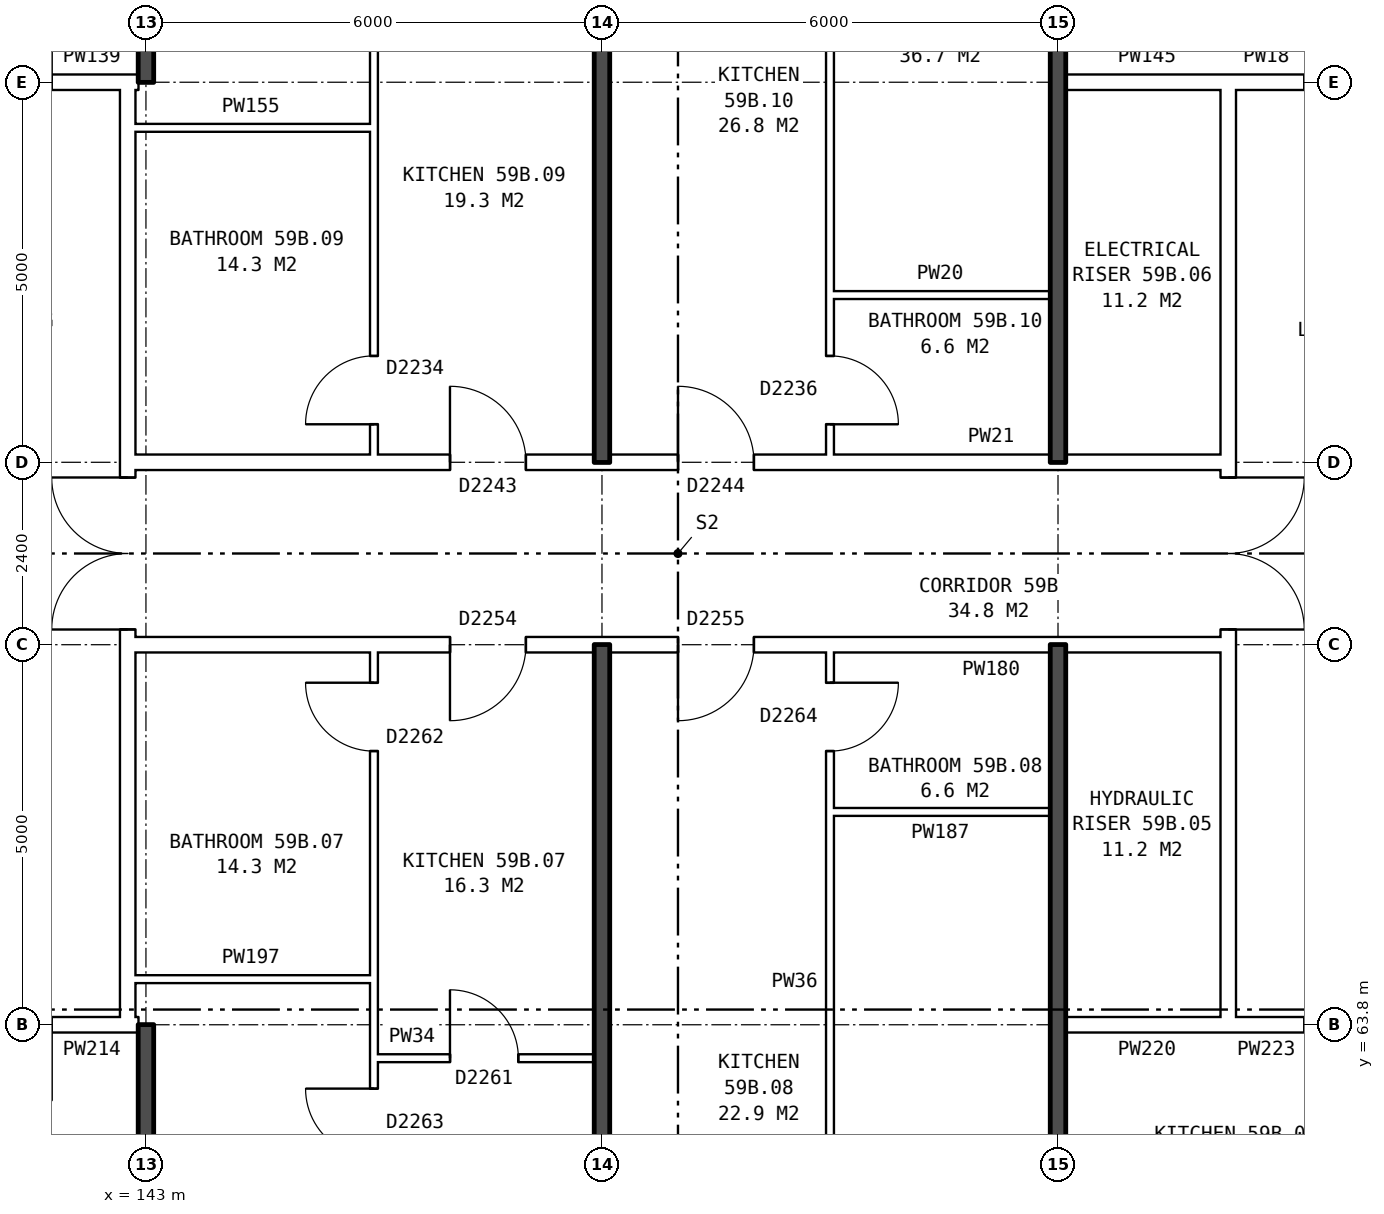
"""IFC4 building model, lengths in metres.
Left out: names, types, materials, properties, quantities, classifications, styles, units other than length and angle.
Written with IfcOpenShell. Run it as: python <this file> out.ifc"""

import sys

from ifc_helpers import new_model, si_unit, direction, frame, frame_2d, origin, place, context, subcontext, project, spatial, rectangle, extrude, element, fill, save


model = new_model("IFC4")
c1 = context("Model", 3, precision=1e-05, world=origin(), true_north=direction((0.0, 1.0)))
c2 = subcontext(c1, "Body", "Model", "MODEL_VIEW")
j1 = project(units=[si_unit("LENGTHUNIT", "METRE"), si_unit("PLANEANGLEUNIT", "RADIAN")], contexts=[c1])
p1 = place(None, origin())
s1 = spatial("IfcSite", under=j1, at=p1, CompositionType="ELEMENT")
p2 = place(p1, origin())
s2 = spatial("IfcBuilding", under=s1, at=p2, CompositionType="ELEMENT")
p3 = place(p2, frame((0.0, 0.0, 209.0)))
s3 = spatial("IfcBuildingStorey", under=s2, at=p3, CompositionType="ELEMENT", Elevation=209.0)
p4 = place(p3, frame((142.76, 63.9, 0.0), z_axis=(0.0, 0.0, 1.0), x_axis=(0.0, 1.0, 0.0)))
e1 = element("IfcWall", 1, at=p4, inside=s3, PredefinedType="PARTITIONING", context=c2, shape_type="SweptSolid", body=[
    extrude(rectangle(XDim=12.2, YDim=0.2, at=frame_2d((6.1, 0.0))), origin(), (0.0, 0.0, 1.0), 2.85),
])
p5 = place(p4, frame((5.1, 0.0, 0.0)))
e2 = element("IfcOpeningElement", 2, at=p5, cuts=e1, PredefinedType="OPENING", context=c2, shape_type="SweptSolid", body=[
    extrude(rectangle(XDim=2.0, YDim=2.1, at=frame_2d((1.0, 1.05))), frame((0.0, 0.11, 0.0), z_axis=(0.0, -1.0, 0.0), x_axis=(1.0, 0.0, 0.0)), (0.0, 0.0, 1.0), 0.22),
])
p6 = place(p3, frame((157.24, 63.9, 0.0), z_axis=(0.0, 0.0, 1.0), x_axis=(0.0, 1.0, 0.0)))
e3 = element("IfcWall", 3, at=p6, inside=s3, PredefinedType="PARTITIONING", context=c2, shape_type="SweptSolid", body=[
    extrude(rectangle(XDim=12.2, YDim=0.2, at=frame_2d((6.1, 0.0))), origin(), (0.0, 0.0, 1.0), 2.85),
])
p7 = place(p6, frame((5.1, 0.0, 0.0)))
e4 = element("IfcOpeningElement", 4, at=p7, cuts=e3, PredefinedType="OPENING", context=c2, shape_type="SweptSolid", body=[
    extrude(rectangle(XDim=2.0, YDim=2.1, at=frame_2d((1.0, 1.05))), frame((0.0, 0.11, 0.0), z_axis=(0.0, -1.0, 0.0), x_axis=(1.0, 0.0, 0.0)), (0.0, 0.0, 1.0), 0.22),
])
p8 = place(p3, frame((146.0, 63.36, 0.0), z_axis=(0.0, 0.0, 1.0), x_axis=(1.0, 0.0, 0.0)))
e5 = element("IfcWall", 5, at=p8, inside=s3, PredefinedType="PARTITIONING", context=c2, shape_type="SweptSolid", body=[
    extrude(rectangle(XDim=2.9, YDim=0.1, at=frame_2d((1.45, 0.0))), origin(), (0.0, 0.0, 1.0), 2.85),
])
p9 = place(p8, frame((1.0, 0.0, 0.0)))
e6 = element("IfcOpeningElement", 6, at=p9, cuts=e5, PredefinedType="OPENING", context=c2, shape_type="SweptSolid", body=[
    extrude(rectangle(XDim=0.9, YDim=2.1, at=frame_2d((0.45, 1.05))), frame((0.0, 0.06, 0.0), z_axis=(0.0, -1.0, 0.0), x_axis=(1.0, 0.0, 0.0)), (0.0, 0.0, 1.0), 0.12),
])
p10 = place(p3, frame((139.76, 63.8, 0.0), z_axis=(0.0, 0.0, 1.0), x_axis=(1.0, 0.0, 0.0)))
e7 = element("IfcWall", 7, at=p10, inside=s3, PredefinedType="PARTITIONING", context=c2, shape_type="SweptSolid", body=[
    extrude(rectangle(XDim=3.0, YDim=0.2, at=frame_2d((1.5, 0.0))), origin(), (0.0, 0.0, 1.0), 2.85),
])
p11 = place(p10, frame((1.0, 0.0, 0.0)))
e8 = element("IfcOpeningElement", 8, at=p11, cuts=e7, PredefinedType="OPENING", context=c2, shape_type="SweptSolid", body=[
    extrude(rectangle(XDim=1.0, YDim=2.1, at=frame_2d((0.5, 1.05))), frame((0.0, 0.11, 0.0), z_axis=(0.0, -1.0, 0.0), x_axis=(1.0, 0.0, 0.0)), (0.0, 0.0, 1.0), 0.22),
])
p12 = place(p3, frame((142.76, 63.8, 0.0), z_axis=(0.0, 0.0, 1.0), x_axis=(1.0, 0.0, 0.0)))
e9 = element("IfcWall", 9, at=p12, inside=s3, PredefinedType="PARTITIONING", context=c2, shape_type="SweptSolid", body=[
    extrude(rectangle(XDim=0.14, YDim=0.2, at=frame_2d((0.07, 0.0))), origin(), (0.0, 0.0, 1.0), 2.85),
])
p13 = place(p3, frame((155.1, 63.8, 0.0), z_axis=(0.0, 0.0, 1.0), x_axis=(1.0, 0.0, 0.0)))
e10 = element("IfcWall", 10, at=p13, inside=s3, PredefinedType="PARTITIONING", context=c2, shape_type="SweptSolid", body=[
    extrude(rectangle(XDim=2.14, YDim=0.2, at=frame_2d((1.07, 0.0))), origin(), (0.0, 0.0, 1.0), 2.85),
])
p14 = place(p3, frame((157.24, 63.8, 0.0), z_axis=(0.0, 0.0, 1.0), x_axis=(1.0, 0.0, 0.0)))
e11 = element("IfcWall", 11, at=p14, inside=s3, PredefinedType="PARTITIONING", context=c2, shape_type="SweptSolid", body=[
    extrude(rectangle(XDim=3.0, YDim=0.2, at=frame_2d((1.5, 0.0))), origin(), (0.0, 0.0, 1.0), 2.85),
])
p15 = place(p14, frame((1.0, 0.0, 0.0)))
e12 = element("IfcOpeningElement", 12, at=p15, cuts=e11, PredefinedType="OPENING", context=c2, shape_type="SweptSolid", body=[
    extrude(rectangle(XDim=1.0, YDim=2.1, at=frame_2d((0.5, 1.05))), frame((0.0, 0.11, 0.0), z_axis=(0.0, -1.0, 0.0), x_axis=(1.0, 0.0, 0.0)), (0.0, 0.0, 1.0), 0.22),
])
p16 = place(p3, frame((142.76, 64.4, 0.0), z_axis=(0.0, 0.0, 1.0), x_axis=(1.0, 0.0, 0.0)))
e13 = element("IfcWall", 13, at=p16, inside=s3, PredefinedType="PARTITIONING", context=c2, shape_type="SweptSolid", body=[
    extrude(rectangle(XDim=3.24, YDim=0.1, at=frame_2d((1.62, 0.0))), origin(), (0.0, 0.0, 1.0), 2.85),
])
p17 = place(p3, frame((152.0, 66.6, 0.0), z_axis=(0.0, 0.0, 1.0), x_axis=(1.0, 0.0, 0.0)))
e14 = element("IfcWall", 14, at=p17, inside=s3, PredefinedType="PARTITIONING", context=c2, shape_type="SweptSolid", body=[
    extrude(rectangle(XDim=2.9, YDim=0.1, at=frame_2d((1.45, 0.0))), origin(), (0.0, 0.0, 1.0), 2.85),
])
p18 = place(p3, frame((142.76, 68.8, 0.0), z_axis=(0.0, 0.0, 1.0), x_axis=(1.0, 0.0, 0.0)))
e15 = element("IfcWall", 15, at=p18, inside=s3, PredefinedType="PARTITIONING", context=c2, shape_type="SweptSolid", body=[
    extrude(rectangle(XDim=14.48, YDim=0.2, at=frame_2d((7.24, 0.0))), origin(), (0.0, 0.0, 1.0), 2.85),
])
p19 = place(p18, frame((4.24, 0.0, 0.0)))
e16 = element("IfcOpeningElement", 16, at=p19, cuts=e15, PredefinedType="OPENING", context=c2, shape_type="SweptSolid", body=[
    extrude(rectangle(XDim=1.0, YDim=2.1, at=frame_2d((0.5, 1.05))), frame((0.0, 0.11, 0.0), z_axis=(0.0, -1.0, 0.0), x_axis=(1.0, 0.0, 0.0)), (0.0, 0.0, 1.0), 0.22),
])
p20 = place(p18, frame((7.24, 0.0, 0.0)))
e17 = element("IfcOpeningElement", 17, at=p20, cuts=e15, PredefinedType="OPENING", context=c2, shape_type="SweptSolid", body=[
    extrude(rectangle(XDim=1.0, YDim=2.1, at=frame_2d((0.5, 1.05))), frame((0.0, 0.11, 0.0), z_axis=(0.0, -1.0, 0.0), x_axis=(1.0, 0.0, 0.0)), (0.0, 0.0, 1.0), 0.22),
])
p21 = place(p3, frame((142.76, 71.2, 0.0), z_axis=(0.0, 0.0, 1.0), x_axis=(1.0, 0.0, 0.0)))
e18 = element("IfcWall", 18, at=p21, inside=s3, PredefinedType="PARTITIONING", context=c2, shape_type="SweptSolid", body=[
    extrude(rectangle(XDim=14.48, YDim=0.2, at=frame_2d((7.24, 0.0))), origin(), (0.0, 0.0, 1.0), 2.85),
])
p22 = place(p21, frame((4.24, 0.0, 0.0)))
e19 = element("IfcOpeningElement", 19, at=p22, cuts=e18, PredefinedType="OPENING", context=c2, shape_type="SweptSolid", body=[
    extrude(rectangle(XDim=1.0, YDim=2.1, at=frame_2d((0.5, 1.05))), frame((0.0, 0.11, 0.0), z_axis=(0.0, -1.0, 0.0), x_axis=(1.0, 0.0, 0.0)), (0.0, 0.0, 1.0), 0.22),
])
p23 = place(p21, frame((7.24, 0.0, 0.0)))
e20 = element("IfcOpeningElement", 20, at=p23, cuts=e18, PredefinedType="OPENING", context=c2, shape_type="SweptSolid", body=[
    extrude(rectangle(XDim=1.0, YDim=2.1, at=frame_2d((0.5, 1.05))), frame((0.0, 0.11, 0.0), z_axis=(0.0, -1.0, 0.0), x_axis=(1.0, 0.0, 0.0)), (0.0, 0.0, 1.0), 0.22),
])
p24 = place(p3, frame((152.0, 73.4, 0.0), z_axis=(0.0, 0.0, 1.0), x_axis=(1.0, 0.0, 0.0)))
e21 = element("IfcWall", 21, at=p24, inside=s3, PredefinedType="PARTITIONING", context=c2, shape_type="SweptSolid", body=[
    extrude(rectangle(XDim=2.9, YDim=0.1, at=frame_2d((1.45, 0.0))), origin(), (0.0, 0.0, 1.0), 2.85),
])
p25 = place(p3, frame((142.76, 75.6, 0.0), z_axis=(0.0, 0.0, 1.0), x_axis=(1.0, 0.0, 0.0)))
e22 = element("IfcWall", 22, at=p25, inside=s3, PredefinedType="PARTITIONING", context=c2, shape_type="SweptSolid", body=[
    extrude(rectangle(XDim=3.24, YDim=0.1, at=frame_2d((1.62, 0.0))), origin(), (0.0, 0.0, 1.0), 2.85),
])
p26 = place(p3, frame((139.76, 76.2, 0.0), z_axis=(0.0, 0.0, 1.0), x_axis=(1.0, 0.0, 0.0)))
e23 = element("IfcWall", 23, at=p26, inside=s3, PredefinedType="PARTITIONING", context=c2, shape_type="SweptSolid", body=[
    extrude(rectangle(XDim=3.0, YDim=0.2, at=frame_2d((1.5, 0.0))), origin(), (0.0, 0.0, 1.0), 2.85),
])
p27 = place(p26, frame((1.0, 0.0, 0.0)))
e24 = element("IfcOpeningElement", 24, at=p27, cuts=e23, PredefinedType="OPENING", context=c2, shape_type="SweptSolid", body=[
    extrude(rectangle(XDim=1.0, YDim=2.1, at=frame_2d((0.5, 1.05))), frame((0.0, 0.11, 0.0), z_axis=(0.0, -1.0, 0.0), x_axis=(1.0, 0.0, 0.0)), (0.0, 0.0, 1.0), 0.22),
])
p28 = place(p3, frame((142.76, 76.2, 0.0), z_axis=(0.0, 0.0, 1.0), x_axis=(1.0, 0.0, 0.0)))
e25 = element("IfcWall", 25, at=p28, inside=s3, PredefinedType="PARTITIONING", context=c2, shape_type="SweptSolid", body=[
    extrude(rectangle(XDim=0.14, YDim=0.2, at=frame_2d((0.07, 0.0))), origin(), (0.0, 0.0, 1.0), 2.85),
])
p29 = place(p3, frame((155.1, 76.2, 0.0), z_axis=(0.0, 0.0, 1.0), x_axis=(1.0, 0.0, 0.0)))
e26 = element("IfcWall", 26, at=p29, inside=s3, PredefinedType="PARTITIONING", context=c2, shape_type="SweptSolid", body=[
    extrude(rectangle(XDim=2.14, YDim=0.2, at=frame_2d((1.07, 0.0))), origin(), (0.0, 0.0, 1.0), 2.85),
])
p30 = place(p3, frame((157.24, 76.2, 0.0), z_axis=(0.0, 0.0, 1.0), x_axis=(1.0, 0.0, 0.0)))
e27 = element("IfcWall", 27, at=p30, inside=s3, PredefinedType="PARTITIONING", context=c2, shape_type="SweptSolid", body=[
    extrude(rectangle(XDim=3.0, YDim=0.2, at=frame_2d((1.5, 0.0))), origin(), (0.0, 0.0, 1.0), 2.85),
])
p31 = place(p30, frame((1.0, 0.0, 0.0)))
e28 = element("IfcOpeningElement", 28, at=p31, cuts=e27, PredefinedType="OPENING", context=c2, shape_type="SweptSolid", body=[
    extrude(rectangle(XDim=1.0, YDim=2.1, at=frame_2d((0.5, 1.05))), frame((0.0, 0.11, 0.0), z_axis=(0.0, -1.0, 0.0), x_axis=(1.0, 0.0, 0.0)), (0.0, 0.0, 1.0), 0.22),
])
for number, where, z_axis, x_axis in (
    (29, (143.0, 54.36, 0.0), (0.0, 0.0, 1.0), (0.0, 1.0, 0.0)),
    (30, (143.0, 76.2, 0.0), (0.0, 0.0, 1.0), (0.0, 1.0, 0.0)),
):
    element("IfcWall", number, at=place(p3, frame(where, z_axis=z_axis, x_axis=x_axis)), inside=s3, PredefinedType="SOLIDWALL", context=c2, shape_type="SweptSolid", body=[
        extrude(rectangle(XDim=9.44, YDim=0.2, at=frame_2d((4.72, 0.0))), origin(), (0.0, 0.0, 1.0), 2.85),
    ])
p32 = place(p3, frame((146.0, 54.36, 0.0), z_axis=(0.0, 0.0, 1.0), x_axis=(0.0, 1.0, 0.0)))
e31 = element("IfcWall", 31, at=p32, inside=s3, PredefinedType="PARTITIONING", context=c2, shape_type="SweptSolid", body=[
    extrude(rectangle(XDim=14.34, YDim=0.1, at=frame_2d((7.17, 0.0))), origin(), (0.0, 0.0, 1.0), 2.85),
])
p33 = place(p32, frame((7.7, 0.0, 0.0)))
e32 = element("IfcOpeningElement", 32, at=p33, cuts=e31, PredefinedType="OPENING", context=c2, shape_type="SweptSolid", body=[
    extrude(rectangle(XDim=0.9, YDim=2.1, at=frame_2d((0.45, 1.05))), frame((0.0, 0.06, 0.0), z_axis=(0.0, -1.0, 0.0), x_axis=(1.0, 0.0, 0.0)), (0.0, 0.0, 1.0), 0.12),
])
p34 = place(p32, frame((13.04, 0.0, 0.0)))
e33 = element("IfcOpeningElement", 33, at=p34, cuts=e31, PredefinedType="OPENING", context=c2, shape_type="SweptSolid", body=[
    extrude(rectangle(XDim=0.9, YDim=2.1, at=frame_2d((0.45, 1.05))), frame((0.0, 0.06, 0.0), z_axis=(0.0, -1.0, 0.0), x_axis=(1.0, 0.0, 0.0)), (0.0, 0.0, 1.0), 0.12),
])
p35 = place(p3, frame((146.0, 71.3, 0.0), z_axis=(0.0, 0.0, 1.0), x_axis=(0.0, 1.0, 0.0)))
e34 = element("IfcWall", 34, at=p35, inside=s3, PredefinedType="PARTITIONING", context=c2, shape_type="SweptSolid", body=[
    extrude(rectangle(XDim=14.34, YDim=0.1, at=frame_2d((7.17, 0.0))), origin(), (0.0, 0.0, 1.0), 2.85),
])
p36 = place(p35, frame((6.74, 0.0, 0.0)))
e35 = element("IfcOpeningElement", 35, at=p36, cuts=e34, PredefinedType="OPENING", context=c2, shape_type="SweptSolid", body=[
    extrude(rectangle(XDim=0.9, YDim=2.1, at=frame_2d((0.45, 1.05))), frame((0.0, 0.06, 0.0), z_axis=(0.0, -1.0, 0.0), x_axis=(1.0, 0.0, 0.0)), (0.0, 0.0, 1.0), 0.12),
])
p37 = place(p35, frame((0.4, 0.0, 0.0)))
e36 = element("IfcOpeningElement", 36, at=p37, cuts=e34, PredefinedType="OPENING", context=c2, shape_type="SweptSolid", body=[
    extrude(rectangle(XDim=0.9, YDim=2.1, at=frame_2d((0.45, 1.05))), frame((0.0, 0.06, 0.0), z_axis=(0.0, -1.0, 0.0), x_axis=(1.0, 0.0, 0.0)), (0.0, 0.0, 1.0), 0.12),
])
for number, where, z_axis, x_axis in (
    (37, (149.0, 54.36, 0.0), (0.0, 0.0, 1.0), (0.0, 1.0, 0.0)),
    (38, (149.0, 71.2, 0.0), (0.0, 0.0, 1.0), (0.0, 1.0, 0.0)),
):
    element("IfcWall", number, at=place(p3, frame(where, z_axis=z_axis, x_axis=x_axis)), inside=s3, PredefinedType="SOLIDWALL", context=c2, shape_type="SweptSolid", body=[
        extrude(rectangle(XDim=14.44, YDim=0.2, at=frame_2d((7.22, 0.0))), origin(), (0.0, 0.0, 1.0), 2.85),
    ])
p38 = place(p3, frame((152.0, 54.36, 0.0), z_axis=(0.0, 0.0, 1.0), x_axis=(0.0, 1.0, 0.0)))
e39 = element("IfcWall", 39, at=p38, inside=s3, PredefinedType="PARTITIONING", context=c2, shape_type="SweptSolid", body=[
    extrude(rectangle(XDim=14.34, YDim=0.1, at=frame_2d((7.17, 0.0))), origin(), (0.0, 0.0, 1.0), 2.85),
])
p39 = place(p38, frame((5.5, 0.0, 0.0)))
e40 = element("IfcOpeningElement", 40, at=p39, cuts=e39, PredefinedType="OPENING", context=c2, shape_type="SweptSolid", body=[
    extrude(rectangle(XDim=0.9, YDim=2.1, at=frame_2d((0.45, 1.05))), frame((0.0, 0.06, 0.0), z_axis=(0.0, -1.0, 0.0), x_axis=(1.0, 0.0, 0.0)), (0.0, 0.0, 1.0), 0.12),
])
p40 = place(p38, frame((13.04, 0.0, 0.0)))
e41 = element("IfcOpeningElement", 41, at=p40, cuts=e39, PredefinedType="OPENING", context=c2, shape_type="SweptSolid", body=[
    extrude(rectangle(XDim=0.9, YDim=2.1, at=frame_2d((0.45, 1.05))), frame((0.0, 0.06, 0.0), z_axis=(0.0, -1.0, 0.0), x_axis=(1.0, 0.0, 0.0)), (0.0, 0.0, 1.0), 0.12),
])
p41 = place(p3, frame((152.0, 71.3, 0.0), z_axis=(0.0, 0.0, 1.0), x_axis=(0.0, 1.0, 0.0)))
e42 = element("IfcWall", 42, at=p41, inside=s3, PredefinedType="PARTITIONING", context=c2, shape_type="SweptSolid", body=[
    extrude(rectangle(XDim=14.34, YDim=0.1, at=frame_2d((7.17, 0.0))), origin(), (0.0, 0.0, 1.0), 2.85),
])
p42 = place(p41, frame((9.24, 0.0, 0.0)))
e43 = element("IfcOpeningElement", 43, at=p42, cuts=e42, PredefinedType="OPENING", context=c2, shape_type="SweptSolid", body=[
    extrude(rectangle(XDim=0.9, YDim=2.1, at=frame_2d((0.45, 1.05))), frame((0.0, 0.06, 0.0), z_axis=(0.0, -1.0, 0.0), x_axis=(1.0, 0.0, 0.0)), (0.0, 0.0, 1.0), 0.12),
])
p43 = place(p41, frame((0.4, 0.0, 0.0)))
e44 = element("IfcOpeningElement", 44, at=p43, cuts=e42, PredefinedType="OPENING", context=c2, shape_type="SweptSolid", body=[
    extrude(rectangle(XDim=0.9, YDim=2.1, at=frame_2d((0.45, 1.05))), frame((0.0, 0.06, 0.0), z_axis=(0.0, -1.0, 0.0), x_axis=(1.0, 0.0, 0.0)), (0.0, 0.0, 1.0), 0.12),
])
for number, where, z_axis, x_axis in (
    (45, (155.0, 54.36, 0.0), (0.0, 0.0, 1.0), (0.0, 1.0, 0.0)),
    (46, (155.0, 71.2, 0.0), (0.0, 0.0, 1.0), (0.0, 1.0, 0.0)),
):
    element("IfcWall", number, at=place(p3, frame(where, z_axis=z_axis, x_axis=x_axis)), inside=s3, PredefinedType="SOLIDWALL", context=c2, shape_type="SweptSolid", body=[
        extrude(rectangle(XDim=14.44, YDim=0.2, at=frame_2d((7.22, 0.0))), origin(), (0.0, 0.0, 1.0), 2.85),
    ])
p44 = place(p5, origin())
e47 = element("IfcDoor", 47, at=p44, inside=s3, OperationType="DOUBLE_DOOR_SINGLE_SWING", PredefinedType="DOOR", context=c2, shape_type="SweptSolid", body=[
    extrude(rectangle(XDim=2.0, YDim=2.1, at=frame_2d((1.0, 1.05))), frame((0.0, 0.025, 0.0), z_axis=(0.0, -1.0, 0.0), x_axis=(1.0, 0.0, 0.0)), (0.0, 0.0, 1.0), 0.05),
])
fill(e2, e47)
p45 = place(p7, frame((2.0, 0.0, 0.0), z_axis=(0.0, 0.0, 1.0), x_axis=(-1.0, 0.0, 0.0)))
e48 = element("IfcDoor", 48, at=p45, inside=s3, OperationType="DOUBLE_DOOR_SINGLE_SWING", PredefinedType="DOOR", context=c2, shape_type="SweptSolid", body=[
    extrude(rectangle(XDim=2.0, YDim=2.1, at=frame_2d((1.0, 1.05))), frame((0.0, 0.025, 0.0), z_axis=(0.0, -1.0, 0.0), x_axis=(1.0, 0.0, 0.0)), (0.0, 0.0, 1.0), 0.05),
])
fill(e4, e48)
p46 = place(p33, origin())
e49 = element("IfcDoor", 49, at=p46, inside=s3, OperationType="SINGLE_SWING_RIGHT", PredefinedType="DOOR", context=c2, shape_type="SweptSolid", body=[
    extrude(rectangle(XDim=0.9, YDim=2.1, at=frame_2d((0.45, 1.05))), frame((0.0, 0.025, 0.0), z_axis=(0.0, -1.0, 0.0), x_axis=(1.0, 0.0, 0.0)), (0.0, 0.0, 1.0), 0.05),
])
fill(e32, e49)
p47 = place(p19, frame((1.0, 0.0, 0.0), z_axis=(0.0, 0.0, 1.0), x_axis=(-1.0, 0.0, 0.0)))
e50 = element("IfcDoor", 50, at=p47, inside=s3, OperationType="SINGLE_SWING_RIGHT", PredefinedType="DOOR", context=c2, shape_type="SweptSolid", body=[
    extrude(rectangle(XDim=1.0, YDim=2.1, at=frame_2d((0.5, 1.05))), frame((0.0, 0.025, 0.0), z_axis=(0.0, -1.0, 0.0), x_axis=(1.0, 0.0, 0.0)), (0.0, 0.0, 1.0), 0.05),
])
fill(e16, e50)
p48 = place(p9, origin())
e51 = element("IfcDoor", 51, at=p48, inside=s3, OperationType="SINGLE_SWING_LEFT", PredefinedType="DOOR", context=c2, shape_type="SweptSolid", body=[
    extrude(rectangle(XDim=0.9, YDim=2.1, at=frame_2d((0.45, 1.05))), frame((0.0, 0.025, 0.0), z_axis=(0.0, -1.0, 0.0), x_axis=(1.0, 0.0, 0.0)), (0.0, 0.0, 1.0), 0.05),
])
fill(e6, e51)
p49 = place(p34, origin())
e52 = element("IfcDoor", 52, at=p49, inside=s3, OperationType="SINGLE_SWING_RIGHT", PredefinedType="DOOR", context=c2, shape_type="SweptSolid", body=[
    extrude(rectangle(XDim=0.9, YDim=2.1, at=frame_2d((0.45, 1.05))), frame((0.0, 0.025, 0.0), z_axis=(0.0, -1.0, 0.0), x_axis=(1.0, 0.0, 0.0)), (0.0, 0.0, 1.0), 0.05),
])
fill(e33, e52)
p50 = place(p20, frame((1.0, 0.0, 0.0), z_axis=(0.0, 0.0, 1.0), x_axis=(-1.0, 0.0, 0.0)))
e53 = element("IfcDoor", 53, at=p50, inside=s3, OperationType="SINGLE_SWING_RIGHT", PredefinedType="DOOR", context=c2, shape_type="SweptSolid", body=[
    extrude(rectangle(XDim=1.0, YDim=2.1, at=frame_2d((0.5, 1.05))), frame((0.0, 0.025, 0.0), z_axis=(0.0, -1.0, 0.0), x_axis=(1.0, 0.0, 0.0)), (0.0, 0.0, 1.0), 0.05),
])
fill(e17, e53)
p51 = place(p40, frame((0.9, 0.0, 0.0), z_axis=(0.0, 0.0, 1.0), x_axis=(-1.0, 0.0, 0.0)))
e54 = element("IfcDoor", 54, at=p51, inside=s3, OperationType="SINGLE_SWING_LEFT", PredefinedType="DOOR", context=c2, shape_type="SweptSolid", body=[
    extrude(rectangle(XDim=0.9, YDim=2.1, at=frame_2d((0.45, 1.05))), frame((0.0, 0.025, 0.0), z_axis=(0.0, -1.0, 0.0), x_axis=(1.0, 0.0, 0.0)), (0.0, 0.0, 1.0), 0.05),
])
fill(e41, e54)
p52 = place(p22, origin())
e55 = element("IfcDoor", 55, at=p52, inside=s3, OperationType="SINGLE_SWING_LEFT", PredefinedType="DOOR", context=c2, shape_type="SweptSolid", body=[
    extrude(rectangle(XDim=1.0, YDim=2.1, at=frame_2d((0.5, 1.05))), frame((0.0, 0.025, 0.0), z_axis=(0.0, -1.0, 0.0), x_axis=(1.0, 0.0, 0.0)), (0.0, 0.0, 1.0), 0.05),
])
fill(e19, e55)
p53 = place(p37, origin())
e56 = element("IfcDoor", 56, at=p53, inside=s3, OperationType="SINGLE_SWING_LEFT", PredefinedType="DOOR", context=c2, shape_type="SweptSolid", body=[
    extrude(rectangle(XDim=0.9, YDim=2.1, at=frame_2d((0.45, 1.05))), frame((0.0, 0.025, 0.0), z_axis=(0.0, -1.0, 0.0), x_axis=(1.0, 0.0, 0.0)), (0.0, 0.0, 1.0), 0.05),
])
fill(e36, e56)
p54 = place(p23, origin())
e57 = element("IfcDoor", 57, at=p54, inside=s3, OperationType="SINGLE_SWING_LEFT", PredefinedType="DOOR", context=c2, shape_type="SweptSolid", body=[
    extrude(rectangle(XDim=1.0, YDim=2.1, at=frame_2d((0.5, 1.05))), frame((0.0, 0.025, 0.0), z_axis=(0.0, -1.0, 0.0), x_axis=(1.0, 0.0, 0.0)), (0.0, 0.0, 1.0), 0.05),
])
fill(e20, e57)
p55 = place(p43, frame((0.9, 0.0, 0.0), z_axis=(0.0, 0.0, 1.0), x_axis=(-1.0, 0.0, 0.0)))
e58 = element("IfcDoor", 58, at=p55, inside=s3, OperationType="SINGLE_SWING_RIGHT", PredefinedType="DOOR", context=c2, shape_type="SweptSolid", body=[
    extrude(rectangle(XDim=0.9, YDim=2.1, at=frame_2d((0.45, 1.05))), frame((0.0, 0.025, 0.0), z_axis=(0.0, -1.0, 0.0), x_axis=(1.0, 0.0, 0.0)), (0.0, 0.0, 1.0), 0.05),
])
fill(e44, e58)
save(model, sys.argv[1])
